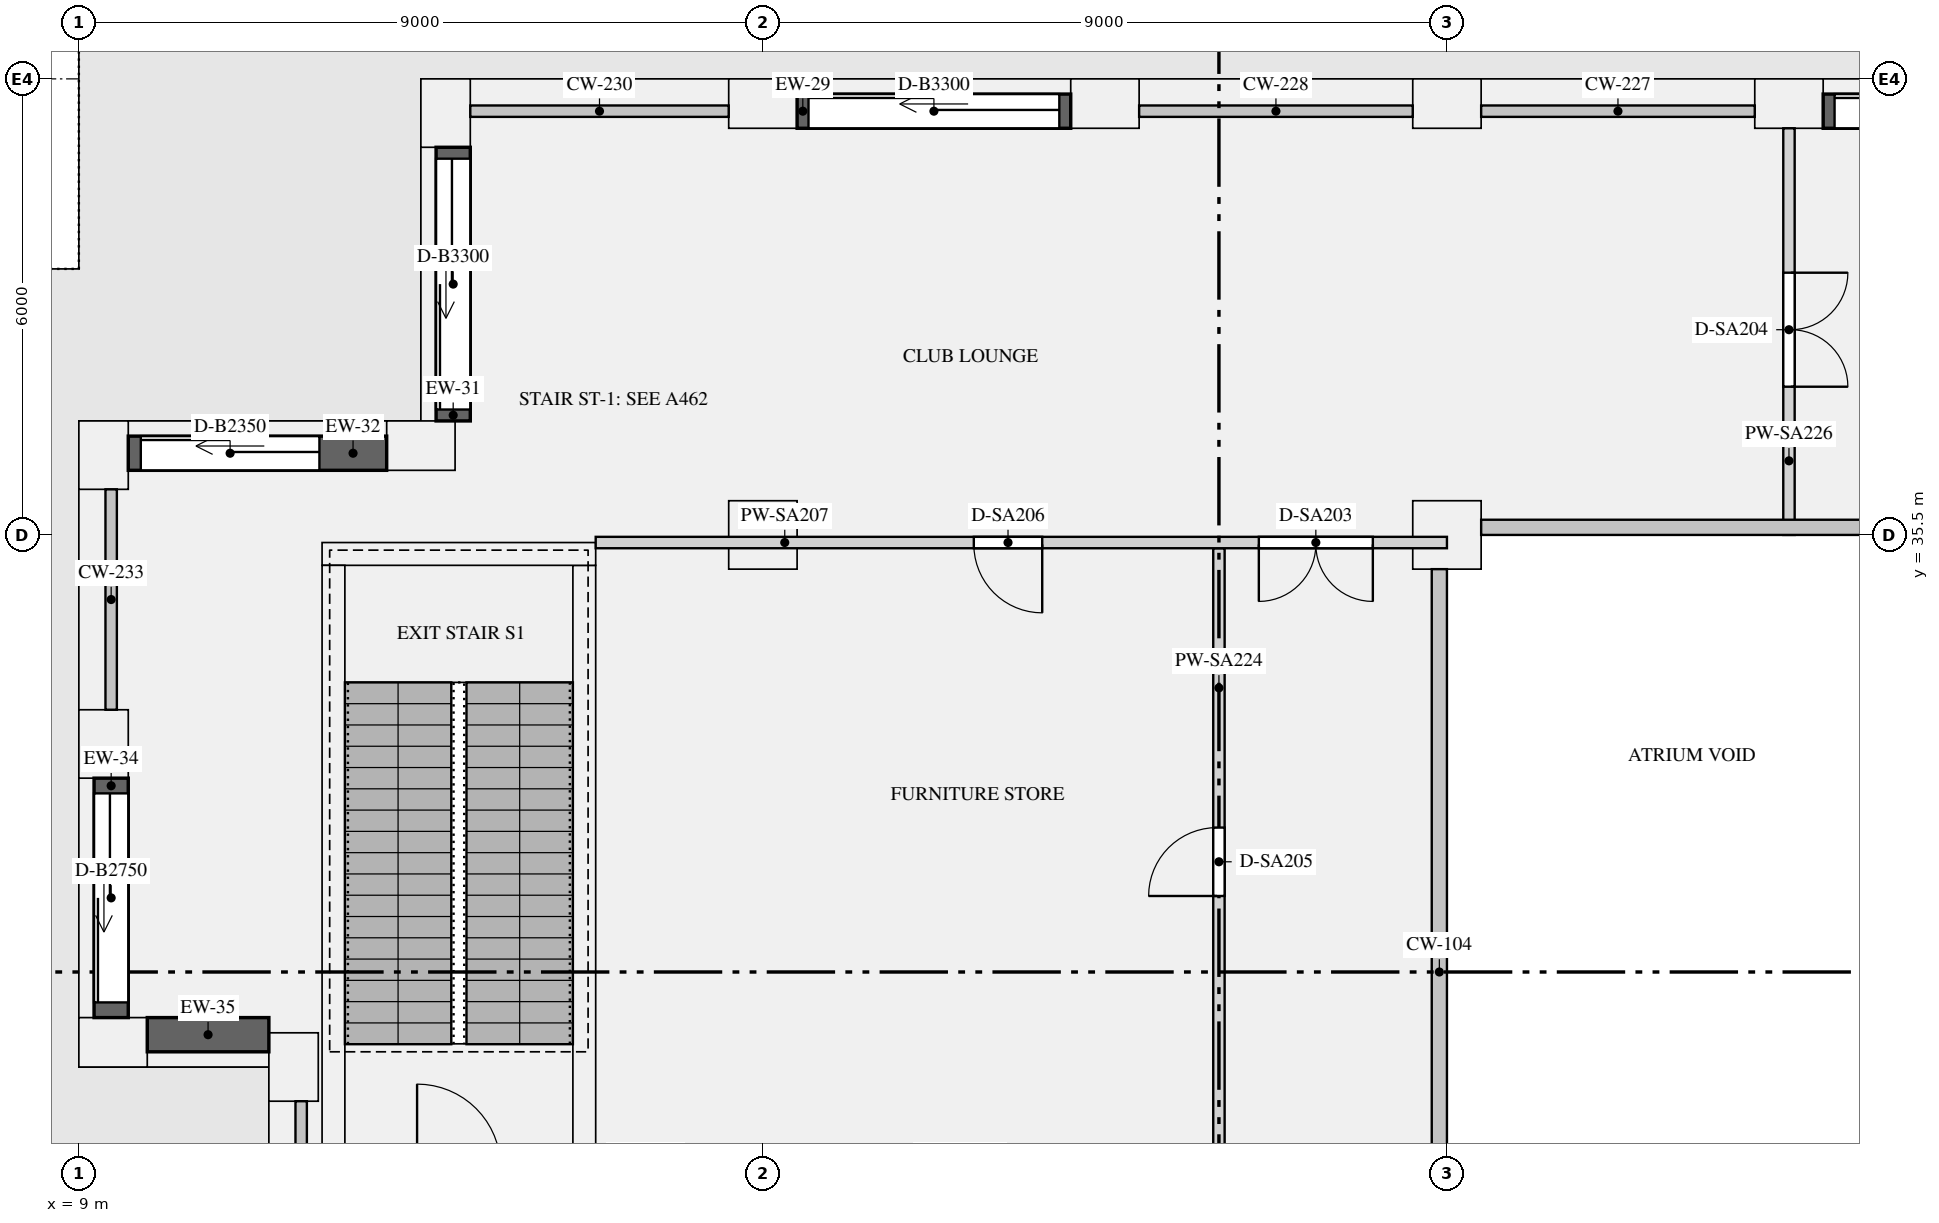
"""IFC4 building model, lengths in metres.
Left out: names, types, materials, properties, quantities, classifications, styles, units other than length and angle.
Written with IfcOpenShell. Run it as: python <this file> out.ifc"""

import sys

from ifc_helpers import new_model, si_unit, direction, frame, frame_2d, origin, origin_2d, place, context, subcontext, project, spatial, rectangle, extrude, element, fill, save


model = new_model("IFC4")
c1 = context("Model", 3, precision=1e-05, world=origin(), true_north=direction((0.0, 1.0)))
c2 = subcontext(c1, "Body", "Model", "MODEL_VIEW")
j1 = project(units=[si_unit("LENGTHUNIT", "METRE"), si_unit("PLANEANGLEUNIT", "RADIAN")], contexts=[c1])
p1 = place(None, origin())
s1 = spatial("IfcSite", under=j1, at=p1, CompositionType="ELEMENT")
p2 = place(p1, origin())
s2 = spatial("IfcBuilding", under=s1, at=p2, CompositionType="ELEMENT")
p3 = place(p2, frame((0.0, 0.0, 191.7)))
s3 = spatial("IfcBuildingStorey", under=s2, at=p3, CompositionType="ELEMENT", Elevation=191.7)
for number, where, z_axis, x_axis in (
    (1, (31.5, 41.175, 0.0), (0.0, 0.0, 1.0), (-1.0, 0.0, 0.0)),
    (2, (27.0, 41.175, 0.0), (0.0, 0.0, 1.0), (-1.0, 0.0, 0.0)),
    (3, (22.5, 41.175, 0.0), (0.0, 0.0, 1.0), (-1.0, 0.0, 0.0)),
    (4, (18.0, 41.175, 0.0), (0.0, 0.0, 1.0), (-1.0, 0.0, 0.0)),
    (5, (13.825, 41.05, 0.0), (0.0, 0.0, 1.0), (0.0, -1.0, 0.0)),
    (6, (13.5, 36.675, 0.0), (0.0, 0.0, 1.0), (-1.0, 0.0, 0.0)),
    (7, (9.325, 36.55, 0.0), (0.0, 0.0, 1.0), (0.0, -1.0, 0.0)),
    (8, (9.325, 32.75, 0.0), (0.0, 0.0, 1.0), (0.0, -1.0, 0.0)),
    (9, (9.45, 28.825, 0.0), (0.0, 0.0, 1.0), (1.0, 0.0, 0.0)),
    (10, (11.825, 28.5, 0.0), (0.0, 0.0, 1.0), (0.0, -1.0, 0.0)),
):
    element("IfcColumn", number, at=place(p3, frame(where, z_axis=z_axis, x_axis=x_axis)), inside=s3, PredefinedType="USERDEFINED", context=c2, shape_type="SweptSolid", body=[
        extrude(rectangle(XDim=0.9, YDim=0.65, at=origin_2d()), origin(), (0.0, 0.0, 1.0), 6.3),
    ])
for number, where, z_axis, x_axis in (
    (11, (18.0, 35.5, 0.0), (0.0, 0.0, 1.0), (1.0, 0.0, 0.0)),
    (12, (27.0, 35.5, 0.0), (0.0, 0.0, 1.0), (1.0, 0.0, 0.0)),
):
    element("IfcColumn", number, at=place(p3, frame(where, z_axis=z_axis, x_axis=x_axis)), inside=s3, PredefinedType="COLUMN", context=c2, shape_type="SweptSolid", body=[
        extrude(rectangle(XDim=0.9, YDim=0.9, at=origin_2d()), origin(), (0.0, 0.0, 1.0), 6.3),
    ])
p4 = place(p3, frame((12.2, 35.25, 0.0), z_axis=(0.0, 0.0, 1.0), x_axis=(1.0, 0.0, 0.0)))
e13 = element("IfcWall", 13, at=p4, inside=s3, PredefinedType="SHEAR", context=c2, shape_type="SweptSolid", body=[
    extrude(rectangle(XDim=3.6, YDim=0.3, at=frame_2d((1.8, 0.0))), origin(), (0.0, 0.0, 1.0), 6.3),
])
for number, where, z_axis, x_axis in (
    (14, (12.35, 27.3, 0.0), (0.0, 0.0, 1.0), (0.0, 1.0, 0.0)),
    (15, (15.65, 27.3, 0.0), (0.0, 0.0, 1.0), (0.0, 1.0, 0.0)),
):
    element("IfcWall", number, at=place(p3, frame(where, z_axis=z_axis, x_axis=x_axis)), inside=s3, PredefinedType="SHEAR", context=c2, shape_type="SweptSolid", body=[
        extrude(rectangle(XDim=7.8, YDim=0.3, at=frame_2d((3.9, 0.0))), origin(), (0.0, 0.0, 1.0), 6.3),
    ])
p5 = place(p3, frame((35.55, 41.075, 0.0), z_axis=(0.0, 0.0, 1.0), x_axis=(-1.0, 0.0, 0.0)))
e16 = element("IfcWall", 16, at=p5, inside=s3, PredefinedType="SOLIDWALL", context=c2, shape_type="SweptSolid", body=[
    extrude(rectangle(XDim=3.6, YDim=0.45, at=frame_2d((1.8, 0.0))), origin(), (0.0, 0.0, 1.0), 5.98),
])
p6 = place(p5, frame((0.15, 0.0, 0.0)))
e17 = element("IfcOpeningElement", 17, at=p6, cuts=e16, PredefinedType="OPENING", context=c2, shape_type="SweptSolid", body=[
    extrude(rectangle(XDim=3.3, YDim=2.3, at=frame_2d((1.65, 1.15))), frame((0.0, 0.235, 0.0), z_axis=(0.0, -1.0, 0.0), x_axis=(1.0, 0.0, 0.0)), (0.0, 0.0, 1.0), 0.47),
])
p7 = place(p3, frame((22.05, 41.075, 0.0), z_axis=(0.0, 0.0, 1.0), x_axis=(-1.0, 0.0, 0.0)))
e18 = element("IfcWall", 18, at=p7, inside=s3, PredefinedType="SOLIDWALL", context=c2, shape_type="SweptSolid", body=[
    extrude(rectangle(XDim=3.6, YDim=0.45, at=frame_2d((1.8, 0.0))), origin(), (0.0, 0.0, 1.0), 5.98),
])
p8 = place(p7, frame((0.15, 0.0, 0.0)))
e19 = element("IfcOpeningElement", 19, at=p8, cuts=e18, PredefinedType="OPENING", context=c2, shape_type="SweptSolid", body=[
    extrude(rectangle(XDim=3.3, YDim=2.3, at=frame_2d((1.65, 1.15))), frame((0.0, 0.235, 0.0), z_axis=(0.0, -1.0, 0.0), x_axis=(1.0, 0.0, 0.0)), (0.0, 0.0, 1.0), 0.47),
])
p9 = place(p3, frame((13.925, 40.6, 0.0), z_axis=(0.0, 0.0, 1.0), x_axis=(0.0, -1.0, 0.0)))
e20 = element("IfcWall", 20, at=p9, inside=s3, PredefinedType="SOLIDWALL", context=c2, shape_type="SweptSolid", body=[
    extrude(rectangle(XDim=3.6, YDim=0.45, at=frame_2d((1.8, 0.0))), origin(), (0.0, 0.0, 1.0), 5.98),
])
p10 = place(p9, frame((0.15, 0.0, 0.0)))
e21 = element("IfcOpeningElement", 21, at=p10, cuts=e20, PredefinedType="OPENING", context=c2, shape_type="SweptSolid", body=[
    extrude(rectangle(XDim=3.3, YDim=2.3, at=frame_2d((1.65, 1.15))), frame((0.0, 0.235, 0.0), z_axis=(0.0, -1.0, 0.0), x_axis=(1.0, 0.0, 0.0)), (0.0, 0.0, 1.0), 0.47),
])
p11 = place(p3, frame((13.05, 36.575, 0.0), z_axis=(0.0, 0.0, 1.0), x_axis=(-1.0, 0.0, 0.0)))
e22 = element("IfcWall", 22, at=p11, inside=s3, PredefinedType="SOLIDWALL", context=c2, shape_type="SweptSolid", body=[
    extrude(rectangle(XDim=3.4, YDim=0.45, at=frame_2d((1.7, 0.0))), origin(), (0.0, 0.0, 1.0), 5.98),
])
p12 = place(p11, frame((0.885, 0.0, 0.0)))
e23 = element("IfcOpeningElement", 23, at=p12, cuts=e22, PredefinedType="OPENING", context=c2, shape_type="SweptSolid", body=[
    extrude(rectangle(XDim=2.35, YDim=2.3, at=frame_2d((1.175, 1.15))), frame((0.0, 0.235, 0.0), z_axis=(0.0, -1.0, 0.0), x_axis=(1.0, 0.0, 0.0)), (0.0, 0.0, 1.0), 0.47),
])
p13 = place(p3, frame((9.425, 32.3, 0.0), z_axis=(0.0, 0.0, 1.0), x_axis=(0.0, -1.0, 0.0)))
e24 = element("IfcWall", 24, at=p13, inside=s3, PredefinedType="SOLIDWALL", context=c2, shape_type="SweptSolid", body=[
    extrude(rectangle(XDim=3.15, YDim=0.45, at=frame_2d((1.575, 0.0))), origin(), (0.0, 0.0, 1.0), 5.98),
])
p14 = place(p13, frame((0.2, 0.0, 0.0)))
e25 = element("IfcOpeningElement", 25, at=p14, cuts=e24, PredefinedType="OPENING", context=c2, shape_type="SweptSolid", body=[
    extrude(rectangle(XDim=2.75, YDim=2.3, at=frame_2d((1.375, 1.15))), frame((0.0, 0.235, 0.0), z_axis=(0.0, -1.0, 0.0), x_axis=(1.0, 0.0, 0.0)), (0.0, 0.0, 1.0), 0.47),
])
p15 = place(p3, frame((9.9, 28.925, 0.9), z_axis=(0.0, 0.0, 1.0), x_axis=(1.0, 0.0, 0.0)))
e26 = element("IfcWall", 26, at=p15, inside=s3, PredefinedType="SOLIDWALL", context=c2, shape_type="SweptSolid", body=[
    extrude(rectangle(XDim=1.6, YDim=0.45, at=frame_2d((0.8, 0.0))), origin(), (0.0, 0.0, 1.0), 5.08),
])
p16 = place(p3, frame((15.8, 35.4, 0.0), z_axis=(0.0, 0.0, 1.0), x_axis=(1.0, 0.0, 0.0)))
e27 = element("IfcWall", 27, at=p16, inside=s3, PredefinedType="PARTITIONING", context=c2, shape_type="SweptSolid", body=[
    extrude(rectangle(XDim=11.2, YDim=0.15, at=frame_2d((5.6, 0.0))), origin(), (0.0, 0.0, 1.0), 5.98),
])
p17 = place(p16, frame((8.725, 0.0, 0.0)))
e28 = element("IfcOpeningElement", 28, at=p17, cuts=e27, PredefinedType="OPENING", context=c2, shape_type="SweptSolid", body=[
    extrude(rectangle(XDim=1.5, YDim=2.1, at=frame_2d((0.75, 1.05))), frame((0.0, 0.085, 0.0), z_axis=(0.0, -1.0, 0.0), x_axis=(1.0, 0.0, 0.0)), (0.0, 0.0, 1.0), 0.17),
])
p18 = place(p16, frame((4.975, 0.0, 0.0)))
e29 = element("IfcOpeningElement", 29, at=p18, cuts=e27, PredefinedType="OPENING", context=c2, shape_type="SweptSolid", body=[
    extrude(rectangle(XDim=0.9, YDim=2.1, at=frame_2d((0.45, 1.05))), frame((0.0, 0.085, 0.0), z_axis=(0.0, -1.0, 0.0), x_axis=(1.0, 0.0, 0.0)), (0.0, 0.0, 1.0), 0.17),
])
p19 = place(p3, frame((24.0, 27.075, 0.0), z_axis=(0.0, 0.0, 1.0), x_axis=(0.0, 1.0, 0.0)))
e30 = element("IfcWall", 30, at=p19, inside=s3, PredefinedType="PARTITIONING", context=c2, shape_type="SweptSolid", body=[
    extrude(rectangle(XDim=8.25, YDim=0.15, at=frame_2d((4.125, 0.0))), origin(), (0.0, 0.0, 1.0), 5.98),
])
p20 = place(p19, frame((3.675, 0.0, 0.0)))
e31 = element("IfcOpeningElement", 31, at=p20, cuts=e30, PredefinedType="OPENING", context=c2, shape_type="SweptSolid", body=[
    extrude(rectangle(XDim=0.9, YDim=2.1, at=frame_2d((0.45, 1.05))), frame((0.0, 0.085, 0.0), z_axis=(0.0, -1.0, 0.0), x_axis=(1.0, 0.0, 0.0)), (0.0, 0.0, 1.0), 0.17),
])
p21 = place(p3, frame((31.5, 35.5, 0.0), z_axis=(0.0, 0.0, 1.0), x_axis=(0.0, 1.0, 0.0)))
e32 = element("IfcWall", 32, at=p21, inside=s3, PredefinedType="PARTITIONING", context=c2, shape_type="SweptSolid", body=[
    extrude(rectangle(XDim=5.35, YDim=0.15, at=frame_2d((2.675, 0.0))), origin(), (0.0, 0.0, 1.0), 5.98),
])
p22 = place(p21, frame((1.95, 0.0, 0.0)))
e33 = element("IfcOpeningElement", 33, at=p22, cuts=e32, PredefinedType="OPENING", context=c2, shape_type="SweptSolid", body=[
    extrude(rectangle(XDim=1.5, YDim=2.1, at=frame_2d((0.75, 1.05))), frame((0.0, 0.085, 0.0), z_axis=(0.0, -1.0, 0.0), x_axis=(1.0, 0.0, 0.0)), (0.0, 0.0, 1.0), 0.17),
])
p23 = place(p6, origin())
e34 = element("IfcDoor", 34, at=p23, inside=s3, OperationType="SLIDING_TO_LEFT", PredefinedType="DOOR", context=c2, shape_type="SweptSolid", body=[
    extrude(rectangle(XDim=3.3, YDim=2.3, at=frame_2d((1.65, 1.15))), frame((0.0, -0.07, 0.0), z_axis=(0.0, -1.0, 0.0), x_axis=(1.0, 0.0, 0.0)), (0.0, 0.0, 1.0), 0.05),
])
fill(e17, e34)
p24 = place(p8, origin())
e35 = element("IfcDoor", 35, at=p24, inside=s3, OperationType="SLIDING_TO_LEFT", PredefinedType="DOOR", context=c2, shape_type="SweptSolid", body=[
    extrude(rectangle(XDim=3.3, YDim=2.3, at=frame_2d((1.65, 1.15))), frame((0.0, -0.07, 0.0), z_axis=(0.0, -1.0, 0.0), x_axis=(1.0, 0.0, 0.0)), (0.0, 0.0, 1.0), 0.05),
])
fill(e19, e35)
p25 = place(p10, origin())
e36 = element("IfcDoor", 36, at=p25, inside=s3, OperationType="SLIDING_TO_LEFT", PredefinedType="DOOR", context=c2, shape_type="SweptSolid", body=[
    extrude(rectangle(XDim=3.3, YDim=2.3, at=frame_2d((1.65, 1.15))), frame((0.0, -0.07, 0.0), z_axis=(0.0, -1.0, 0.0), x_axis=(1.0, 0.0, 0.0)), (0.0, 0.0, 1.0), 0.05),
])
fill(e21, e36)
p26 = place(p12, origin())
e37 = element("IfcDoor", 37, at=p26, inside=s3, OperationType="SLIDING_TO_LEFT", PredefinedType="DOOR", context=c2, shape_type="SweptSolid", body=[
    extrude(rectangle(XDim=2.35, YDim=2.3, at=frame_2d((1.175, 1.15))), frame((0.0, -0.07, 0.0), z_axis=(0.0, -1.0, 0.0), x_axis=(1.0, 0.0, 0.0)), (0.0, 0.0, 1.0), 0.05),
])
fill(e23, e37)
p27 = place(p14, origin())
e38 = element("IfcDoor", 38, at=p27, inside=s3, OperationType="SLIDING_TO_LEFT", PredefinedType="DOOR", context=c2, shape_type="SweptSolid", body=[
    extrude(rectangle(XDim=2.75, YDim=2.3, at=frame_2d((1.375, 1.15))), frame((0.0, -0.07, 0.0), z_axis=(0.0, -1.0, 0.0), x_axis=(1.0, 0.0, 0.0)), (0.0, 0.0, 1.0), 0.05),
])
fill(e25, e38)
p28 = place(p17, frame((1.5, 0.0, 0.0), z_axis=(0.0, 0.0, 1.0), x_axis=(-1.0, 0.0, 0.0)))
e39 = element("IfcDoor", 39, at=p28, inside=s3, OperationType="DOUBLE_DOOR_SINGLE_SWING", PredefinedType="DOOR", context=c2, shape_type="SweptSolid", body=[
    extrude(rectangle(XDim=1.5, YDim=2.1, at=frame_2d((0.75, 1.05))), frame((0.0, 0.025, 0.0), z_axis=(0.0, -1.0, 0.0), x_axis=(1.0, 0.0, 0.0)), (0.0, 0.0, 1.0), 0.05),
])
fill(e28, e39)
p29 = place(p22, frame((1.5, 0.0, 0.0), z_axis=(0.0, 0.0, 1.0), x_axis=(-1.0, 0.0, 0.0)))
e40 = element("IfcDoor", 40, at=p29, inside=s3, OperationType="DOUBLE_DOOR_SINGLE_SWING", PredefinedType="DOOR", context=c2, shape_type="SweptSolid", body=[
    extrude(rectangle(XDim=1.5, YDim=2.1, at=frame_2d((0.75, 1.05))), frame((0.0, 0.025, 0.0), z_axis=(0.0, -1.0, 0.0), x_axis=(1.0, 0.0, 0.0)), (0.0, 0.0, 1.0), 0.05),
])
fill(e33, e40)
p30 = place(p20, origin())
e41 = element("IfcDoor", 41, at=p30, inside=s3, OperationType="SINGLE_SWING_LEFT", PredefinedType="DOOR", context=c2, shape_type="SweptSolid", body=[
    extrude(rectangle(XDim=0.9, YDim=2.1, at=frame_2d((0.45, 1.05))), frame((0.0, 0.025, 0.0), z_axis=(0.0, -1.0, 0.0), x_axis=(1.0, 0.0, 0.0)), (0.0, 0.0, 1.0), 0.05),
])
fill(e31, e41)
p31 = place(p18, frame((0.9, 0.0, 0.0), z_axis=(0.0, 0.0, 1.0), x_axis=(-1.0, 0.0, 0.0)))
e42 = element("IfcDoor", 42, at=p31, inside=s3, OperationType="SINGLE_SWING_LEFT", PredefinedType="DOOR", context=c2, shape_type="SweptSolid", body=[
    extrude(rectangle(XDim=0.9, YDim=2.1, at=frame_2d((0.45, 1.05))), frame((0.0, 0.025, 0.0), z_axis=(0.0, -1.0, 0.0), x_axis=(1.0, 0.0, 0.0)), (0.0, 0.0, 1.0), 0.05),
])
fill(e29, e42)
save(model, sys.argv[1])
